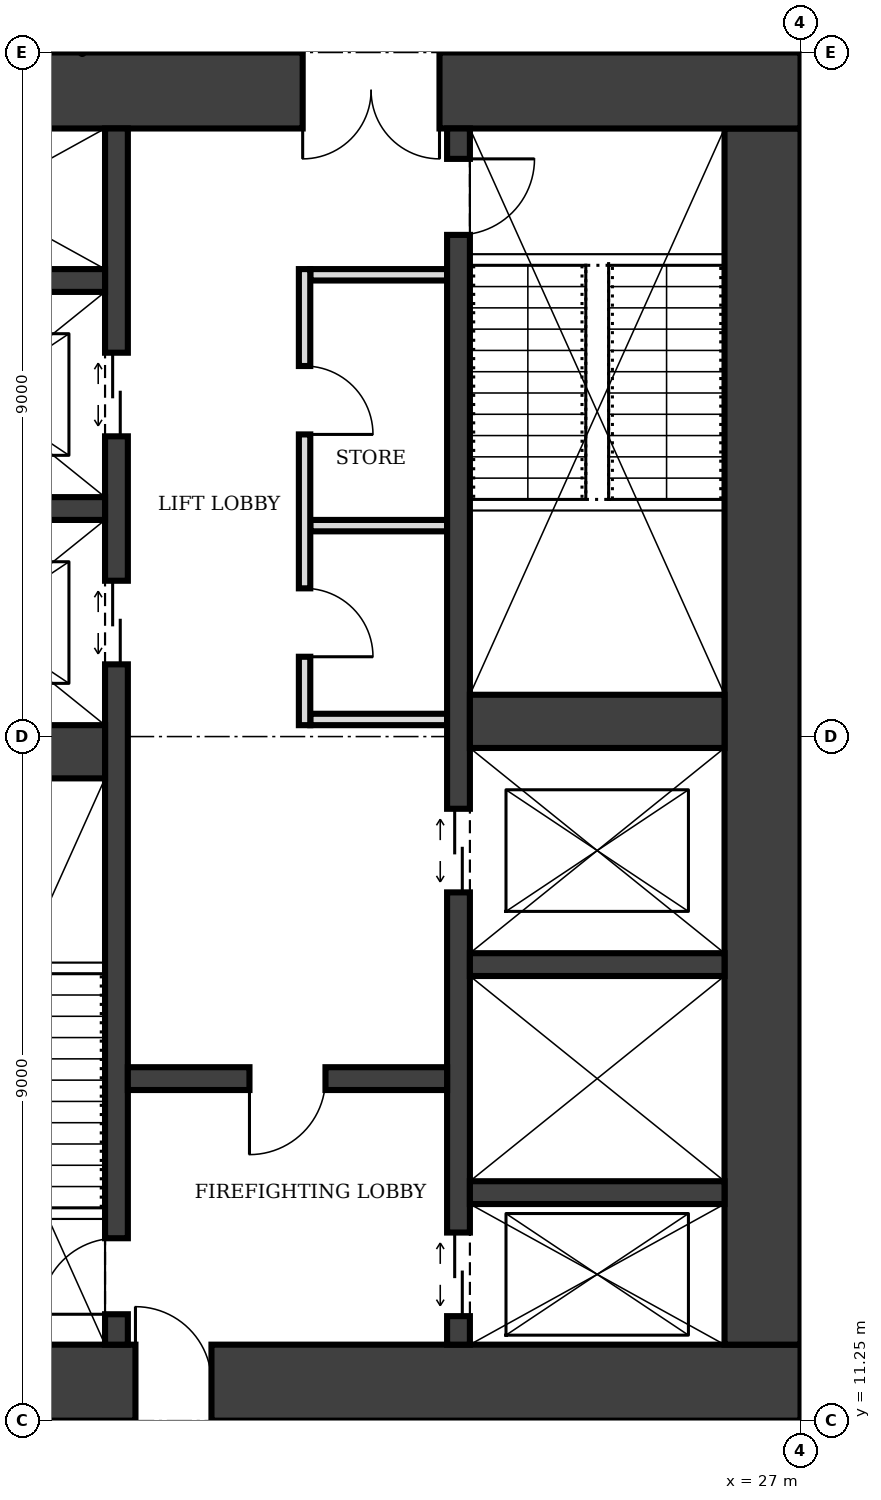
"""IFC4 building model, lengths in metres.
Left out: names, types, materials, properties, quantities, classifications, styles, units other than length and angle.
Written with IfcOpenShell. Run it as: python <this file> out.ifc"""

import sys

from ifc_helpers import new_model, si_unit, direction, frame, frame_2d, origin, place, context, subcontext, project, spatial, rectangle, extrude, element, fill, save


model = new_model("IFC4")
c1 = context("Model", 3, precision=1e-05, world=origin(), true_north=direction((0.0, 1.0)))
c2 = subcontext(c1, "Body", "Model", "MODEL_VIEW")
j1 = project(units=[si_unit("LENGTHUNIT", "METRE"), si_unit("PLANEANGLEUNIT", "RADIAN")], contexts=[c1])
p1 = place(None, origin())
s1 = spatial("IfcSite", under=j1, at=p1, CompositionType="ELEMENT")
p2 = place(p1, origin())
s2 = spatial("IfcBuilding", under=s1, at=p2, CompositionType="ELEMENT")
p3 = place(p2, frame((0.0, 0.0, 37.0)))
s3 = spatial("IfcBuildingStorey", under=s2, at=p3, CompositionType="ELEMENT", Elevation=37.0)
p4 = place(p3, frame((13.5, 11.75, 0.0), z_axis=(0.0, 0.0, 1.0), x_axis=(1.0, 0.0, 0.0)))
e1 = element("IfcWall", 1, at=p4, inside=s3, PredefinedType="SHEAR", context=c2, shape_type="SweptSolid", body=[
    extrude(rectangle(XDim=13.5, YDim=1.0, at=frame_2d((6.75, 0.0))), origin(), (0.0, 0.0, 1.0), 4.0),
])
p5 = place(p4, frame((4.75, 0.0, 0.0)))
e2 = element("IfcOpeningElement", 2, at=p5, cuts=e1, PredefinedType="OPENING", context=c2, shape_type="SweptSolid", body=[
    extrude(rectangle(XDim=1.0, YDim=2.1, at=frame_2d((0.5, 1.05))), frame((0.0, 0.51, 0.0), z_axis=(0.0, -1.0, 0.0), x_axis=(1.0, 0.0, 0.0)), (0.0, 0.0, 1.0), 1.02),
])
p6 = place(p3, frame((26.5, 12.25, 0.0), z_axis=(0.0, 0.0, 1.0), x_axis=(0.0, 1.0, 0.0)))
e3 = element("IfcWall", 3, at=p6, inside=s3, PredefinedType="SHEAR", context=c2, shape_type="SweptSolid", body=[
    extrude(rectangle(XDim=16.0, YDim=1.0, at=frame_2d((8.0, 0.0))), origin(), (0.0, 0.0, 1.0), 4.0),
])
p7 = place(p3, frame((27.0, 28.75, 0.0), z_axis=(0.0, 0.0, 1.0), x_axis=(-1.0, 0.0, 0.0)))
e4 = element("IfcWall", 4, at=p7, inside=s3, PredefinedType="SHEAR", context=c2, shape_type="SweptSolid", body=[
    extrude(rectangle(XDim=13.5, YDim=1.0, at=frame_2d((6.75, 0.0))), origin(), (0.0, 0.0, 1.0), 4.0),
])
p8 = place(p7, frame((4.75, 0.0, 0.0)))
e5 = element("IfcOpeningElement", 5, at=p8, cuts=e4, PredefinedType="OPENING", context=c2, shape_type="SweptSolid", body=[
    extrude(rectangle(XDim=1.8, YDim=2.1, at=frame_2d((0.9, 1.05))), frame((0.0, 0.51, 0.0), z_axis=(0.0, -1.0, 0.0), x_axis=(1.0, 0.0, 0.0)), (0.0, 0.0, 1.0), 1.02),
])
p9 = place(p3, frame((18.0, 12.25, 0.0), z_axis=(0.0, 0.0, 1.0), x_axis=(0.0, 1.0, 0.0)))
e6 = element("IfcWall", 6, at=p9, inside=s3, PredefinedType="SHEAR", context=c2, shape_type="SweptSolid", body=[
    extrude(rectangle(XDim=16.0, YDim=0.3, at=frame_2d((8.0, 0.0))), origin(), (0.0, 0.0, 1.0), 4.0),
])
p10 = place(p9, frame((0.4, 0.0, 0.0)))
e7 = element("IfcOpeningElement", 7, at=p10, cuts=e6, PredefinedType="OPENING", context=c2, shape_type="SweptSolid", body=[
    extrude(rectangle(XDim=1.0, YDim=2.1, at=frame_2d((0.5, 1.05))), frame((0.0, 0.16, 0.0), z_axis=(0.0, -1.0, 0.0), x_axis=(1.0, 0.0, 0.0)), (0.0, 0.0, 1.0), 0.32),
])
p11 = place(p9, frame((8.95, 0.0, 0.0)))
e8 = element("IfcOpeningElement", 8, at=p11, cuts=e6, PredefinedType="OPENING", context=c2, shape_type="SweptSolid", body=[
    extrude(rectangle(XDim=1.1, YDim=2.1, at=frame_2d((0.55, 1.05))), frame((0.0, 0.16, 0.0), z_axis=(0.0, -1.0, 0.0), x_axis=(1.0, 0.0, 0.0)), (0.0, 0.0, 1.0), 0.32),
])
p12 = place(p9, frame((11.95, 0.0, 0.0)))
e9 = element("IfcOpeningElement", 9, at=p12, cuts=e6, PredefinedType="OPENING", context=c2, shape_type="SweptSolid", body=[
    extrude(rectangle(XDim=1.1, YDim=2.1, at=frame_2d((0.55, 1.05))), frame((0.0, 0.16, 0.0), z_axis=(0.0, -1.0, 0.0), x_axis=(1.0, 0.0, 0.0)), (0.0, 0.0, 1.0), 0.32),
])
p13 = place(p3, frame((22.5, 12.25, 0.0), z_axis=(0.0, 0.0, 1.0), x_axis=(0.0, 1.0, 0.0)))
e10 = element("IfcWall", 10, at=p13, inside=s3, PredefinedType="SHEAR", context=c2, shape_type="SweptSolid", body=[
    extrude(rectangle(XDim=16.0, YDim=0.3, at=frame_2d((8.0, 0.0))), origin(), (0.0, 0.0, 1.0), 4.0),
])
p14 = place(p13, frame((14.6, 0.0, 0.0)))
e11 = element("IfcOpeningElement", 11, at=p14, cuts=e10, PredefinedType="OPENING", context=c2, shape_type="SweptSolid", body=[
    extrude(rectangle(XDim=1.0, YDim=2.1, at=frame_2d((0.5, 1.05))), frame((0.0, 0.16, 0.0), z_axis=(0.0, -1.0, 0.0), x_axis=(1.0, 0.0, 0.0)), (0.0, 0.0, 1.0), 0.32),
])
p15 = place(p13, frame((0.375, 0.0, 0.0)))
e12 = element("IfcOpeningElement", 12, at=p15, cuts=e10, PredefinedType="OPENING", context=c2, shape_type="SweptSolid", body=[
    extrude(rectangle(XDim=1.1, YDim=2.1, at=frame_2d((0.55, 1.05))), frame((0.0, 0.16, 0.0), z_axis=(0.0, -1.0, 0.0), x_axis=(1.0, 0.0, 0.0)), (0.0, 0.0, 1.0), 0.32),
])
p16 = place(p13, frame((5.95, 0.0, 0.0)))
e13 = element("IfcOpeningElement", 13, at=p16, cuts=e10, PredefinedType="OPENING", context=c2, shape_type="SweptSolid", body=[
    extrude(rectangle(XDim=1.1, YDim=2.1, at=frame_2d((0.55, 1.05))), frame((0.0, 0.16, 0.0), z_axis=(0.0, -1.0, 0.0), x_axis=(1.0, 0.0, 0.0)), (0.0, 0.0, 1.0), 0.32),
])
p17 = place(p3, frame((14.5, 20.05, 0.0), z_axis=(0.0, 0.0, 1.0), x_axis=(1.0, 0.0, 0.0)))
e14 = element("IfcWall", 14, at=p17, inside=s3, PredefinedType="SHEAR", context=c2, shape_type="SweptSolid", body=[
    extrude(rectangle(XDim=3.35, YDim=0.7, at=frame_2d((1.675, 0.0))), origin(), (0.0, 0.0, 1.0), 4.0),
])
p18 = place(p3, frame((18.15, 15.75, 0.0), z_axis=(0.0, 0.0, 1.0), x_axis=(1.0, 0.0, 0.0)))
e15 = element("IfcWall", 15, at=p18, inside=s3, PredefinedType="SHEAR", context=c2, shape_type="SweptSolid", body=[
    extrude(rectangle(XDim=4.2, YDim=0.3, at=frame_2d((2.1, 0.0))), origin(), (0.0, 0.0, 1.0), 4.0),
])
p19 = place(p18, frame((1.6, 0.0, 0.0)))
e16 = element("IfcOpeningElement", 16, at=p19, cuts=e15, PredefinedType="OPENING", context=c2, shape_type="SweptSolid", body=[
    extrude(rectangle(XDim=1.0, YDim=2.1, at=frame_2d((0.5, 1.05))), frame((0.0, 0.16, 0.0), z_axis=(0.0, -1.0, 0.0), x_axis=(1.0, 0.0, 0.0)), (0.0, 0.0, 1.0), 0.32),
])
for number, where, z_axis, x_axis in (
    (17, (22.65, 14.25, 0.0), (0.0, 0.0, 1.0), (1.0, 0.0, 0.0)),
    (18, (22.65, 17.25, 0.0), (0.0, 0.0, 1.0), (1.0, 0.0, 0.0)),
):
    element("IfcWall", number, at=place(p3, frame(where, z_axis=z_axis, x_axis=x_axis)), inside=s3, PredefinedType="SHEAR", context=c2, shape_type="SweptSolid", body=[
        extrude(rectangle(XDim=3.35, YDim=0.3, at=frame_2d((1.675, 0.0))), origin(), (0.0, 0.0, 1.0), 4.0),
    ])
p20 = place(p3, frame((22.65, 20.45, 0.0), z_axis=(0.0, 0.0, 1.0), x_axis=(1.0, 0.0, 0.0)))
e19 = element("IfcWall", 19, at=p20, inside=s3, PredefinedType="SHEAR", context=c2, shape_type="SweptSolid", body=[
    extrude(rectangle(XDim=3.35, YDim=0.7, at=frame_2d((1.675, 0.0))), origin(), (0.0, 0.0, 1.0), 4.0),
])
for number, where, z_axis, x_axis in (
    (20, (14.5, 23.25, 0.0), (0.0, 0.0, 1.0), (1.0, 0.0, 0.0)),
    (21, (14.5, 26.25, 0.0), (0.0, 0.0, 1.0), (1.0, 0.0, 0.0)),
):
    element("IfcWall", number, at=place(p3, frame(where, z_axis=z_axis, x_axis=x_axis)), inside=s3, PredefinedType="SHEAR", context=c2, shape_type="SweptSolid", body=[
        extrude(rectangle(XDim=3.35, YDim=0.3, at=frame_2d((1.675, 0.0))), origin(), (0.0, 0.0, 1.0), 4.0),
    ])
p21 = place(p3, frame((20.475, 20.4, 0.0), z_axis=(0.0, 0.0, 1.0), x_axis=(0.0, 1.0, 0.0)))
e22 = element("IfcWall", 22, at=p21, inside=s3, PredefinedType="PARTITIONING", context=c2, shape_type="SweptSolid", body=[
    extrude(rectangle(XDim=6.0, YDim=0.15, at=frame_2d((3.0, 0.0))), origin(), (0.0, 0.0, 1.0), 3.75),
])
p22 = place(p21, frame((0.9, 0.0, 0.0)))
e23 = element("IfcOpeningElement", 23, at=p22, cuts=e22, PredefinedType="OPENING", context=c2, shape_type="SweptSolid", body=[
    extrude(rectangle(XDim=0.9, YDim=2.1, at=frame_2d((0.45, 1.05))), frame((0.0, 0.085, 0.0), z_axis=(0.0, -1.0, 0.0), x_axis=(1.0, 0.0, 0.0)), (0.0, 0.0, 1.0), 0.17),
])
p23 = place(p21, frame((3.825, 0.0, 0.0)))
e24 = element("IfcOpeningElement", 24, at=p23, cuts=e22, PredefinedType="OPENING", context=c2, shape_type="SweptSolid", body=[
    extrude(rectangle(XDim=0.9, YDim=2.1, at=frame_2d((0.45, 1.05))), frame((0.0, 0.085, 0.0), z_axis=(0.0, -1.0, 0.0), x_axis=(1.0, 0.0, 0.0)), (0.0, 0.0, 1.0), 0.17),
])
for number, where, z_axis, x_axis in (
    (25, (20.55, 20.475, 0.0), (0.0, 0.0, 1.0), (1.0, 0.0, 0.0)),
    (26, (20.55, 23.025, 0.0), (0.0, 0.0, 1.0), (1.0, 0.0, 0.0)),
    (27, (20.55, 26.325, 0.0), (0.0, 0.0, 1.0), (1.0, 0.0, 0.0)),
):
    element("IfcWall", number, at=place(p3, frame(where, z_axis=z_axis, x_axis=x_axis)), inside=s3, PredefinedType="PARTITIONING", context=c2, shape_type="SweptSolid", body=[
        extrude(rectangle(XDim=1.8, YDim=0.15, at=frame_2d((0.9, 0.0))), origin(), (0.0, 0.0, 1.0), 3.75),
    ])
p24 = place(p5, origin())
e28 = element("IfcDoor", 28, at=p24, inside=s3, OperationType="SINGLE_SWING_LEFT", PredefinedType="DOOR", context=c2, shape_type="SweptSolid", body=[
    extrude(rectangle(XDim=1.0, YDim=2.1, at=frame_2d((0.5, 1.05))), frame((0.0, 0.025, 0.0), z_axis=(0.0, -1.0, 0.0), x_axis=(1.0, 0.0, 0.0)), (0.0, 0.0, 1.0), 0.05),
])
fill(e2, e28)
p25 = place(p8, origin())
e29 = element("IfcDoor", 29, at=p25, inside=s3, OperationType="DOUBLE_DOOR_SINGLE_SWING", PredefinedType="DOOR", context=c2, shape_type="SweptSolid", body=[
    extrude(rectangle(XDim=1.8, YDim=2.1, at=frame_2d((0.9, 1.05))), frame((0.0, 0.025, 0.0), z_axis=(0.0, -1.0, 0.0), x_axis=(1.0, 0.0, 0.0)), (0.0, 0.0, 1.0), 0.05),
])
fill(e5, e29)
p26 = place(p19, frame((1.0, 0.0, 0.0), z_axis=(0.0, 0.0, 1.0), x_axis=(-1.0, 0.0, 0.0)))
e30 = element("IfcDoor", 30, at=p26, inside=s3, OperationType="SINGLE_SWING_RIGHT", PredefinedType="DOOR", context=c2, shape_type="SweptSolid", body=[
    extrude(rectangle(XDim=1.0, YDim=2.1, at=frame_2d((0.5, 1.05))), frame((0.0, 0.025, 0.0), z_axis=(0.0, -1.0, 0.0), x_axis=(1.0, 0.0, 0.0)), (0.0, 0.0, 1.0), 0.05),
])
fill(e16, e30)
p27 = place(p10, origin())
e31 = element("IfcDoor", 31, at=p27, inside=s3, OperationType="SINGLE_SWING_LEFT", PredefinedType="DOOR", context=c2, shape_type="SweptSolid", body=[
    extrude(rectangle(XDim=1.0, YDim=2.1, at=frame_2d((0.5, 1.05))), frame((0.0, 0.025, 0.0), z_axis=(0.0, -1.0, 0.0), x_axis=(1.0, 0.0, 0.0)), (0.0, 0.0, 1.0), 0.05),
])
fill(e7, e31)
p28 = place(p14, frame((1.0, 0.0, 0.0), z_axis=(0.0, 0.0, 1.0), x_axis=(-1.0, 0.0, 0.0)))
e32 = element("IfcDoor", 32, at=p28, inside=s3, OperationType="SINGLE_SWING_LEFT", PredefinedType="DOOR", context=c2, shape_type="SweptSolid", body=[
    extrude(rectangle(XDim=1.0, YDim=2.1, at=frame_2d((0.5, 1.05))), frame((0.0, 0.025, 0.0), z_axis=(0.0, -1.0, 0.0), x_axis=(1.0, 0.0, 0.0)), (0.0, 0.0, 1.0), 0.05),
])
fill(e11, e32)
p29 = place(p15, origin())
e33 = element("IfcDoor", 33, at=p29, inside=s3, OperationType="DOUBLE_DOOR_SLIDING", PredefinedType="DOOR", context=c2, shape_type="SweptSolid", body=[
    extrude(rectangle(XDim=1.1, YDim=2.1, at=frame_2d((0.55, 1.05))), frame((0.0, 0.025, 0.0), z_axis=(0.0, -1.0, 0.0), x_axis=(1.0, 0.0, 0.0)), (0.0, 0.0, 1.0), 0.05),
])
fill(e12, e33)
p30 = place(p11, origin())
e34 = element("IfcDoor", 34, at=p30, inside=s3, OperationType="DOUBLE_DOOR_SLIDING", PredefinedType="DOOR", context=c2, shape_type="SweptSolid", body=[
    extrude(rectangle(XDim=1.1, YDim=2.1, at=frame_2d((0.55, 1.05))), frame((0.0, 0.025, 0.0), z_axis=(0.0, -1.0, 0.0), x_axis=(1.0, 0.0, 0.0)), (0.0, 0.0, 1.0), 0.05),
])
fill(e8, e34)
p31 = place(p12, origin())
e35 = element("IfcDoor", 35, at=p31, inside=s3, OperationType="DOUBLE_DOOR_SLIDING", PredefinedType="DOOR", context=c2, shape_type="SweptSolid", body=[
    extrude(rectangle(XDim=1.1, YDim=2.1, at=frame_2d((0.55, 1.05))), frame((0.0, 0.025, 0.0), z_axis=(0.0, -1.0, 0.0), x_axis=(1.0, 0.0, 0.0)), (0.0, 0.0, 1.0), 0.05),
])
fill(e9, e35)
p32 = place(p16, origin())
e36 = element("IfcDoor", 36, at=p32, inside=s3, OperationType="DOUBLE_DOOR_SLIDING", PredefinedType="DOOR", context=c2, shape_type="SweptSolid", body=[
    extrude(rectangle(XDim=1.1, YDim=2.1, at=frame_2d((0.55, 1.05))), frame((0.0, 0.025, 0.0), z_axis=(0.0, -1.0, 0.0), x_axis=(1.0, 0.0, 0.0)), (0.0, 0.0, 1.0), 0.05),
])
fill(e13, e36)
p33 = place(p22, frame((0.9, 0.0, 0.0), z_axis=(0.0, 0.0, 1.0), x_axis=(-1.0, 0.0, 0.0)))
e37 = element("IfcDoor", 37, at=p33, inside=s3, OperationType="SINGLE_SWING_RIGHT", PredefinedType="DOOR", context=c2, shape_type="SweptSolid", body=[
    extrude(rectangle(XDim=0.9, YDim=2.1, at=frame_2d((0.45, 1.05))), frame((0.0, 0.025, 0.0), z_axis=(0.0, -1.0, 0.0), x_axis=(1.0, 0.0, 0.0)), (0.0, 0.0, 1.0), 0.05),
])
fill(e23, e37)
p34 = place(p23, frame((0.9, 0.0, 0.0), z_axis=(0.0, 0.0, 1.0), x_axis=(-1.0, 0.0, 0.0)))
e38 = element("IfcDoor", 38, at=p34, inside=s3, OperationType="SINGLE_SWING_RIGHT", PredefinedType="DOOR", context=c2, shape_type="SweptSolid", body=[
    extrude(rectangle(XDim=0.9, YDim=2.1, at=frame_2d((0.45, 1.05))), frame((0.0, 0.025, 0.0), z_axis=(0.0, -1.0, 0.0), x_axis=(1.0, 0.0, 0.0)), (0.0, 0.0, 1.0), 0.05),
])
fill(e24, e38)
save(model, sys.argv[1])
